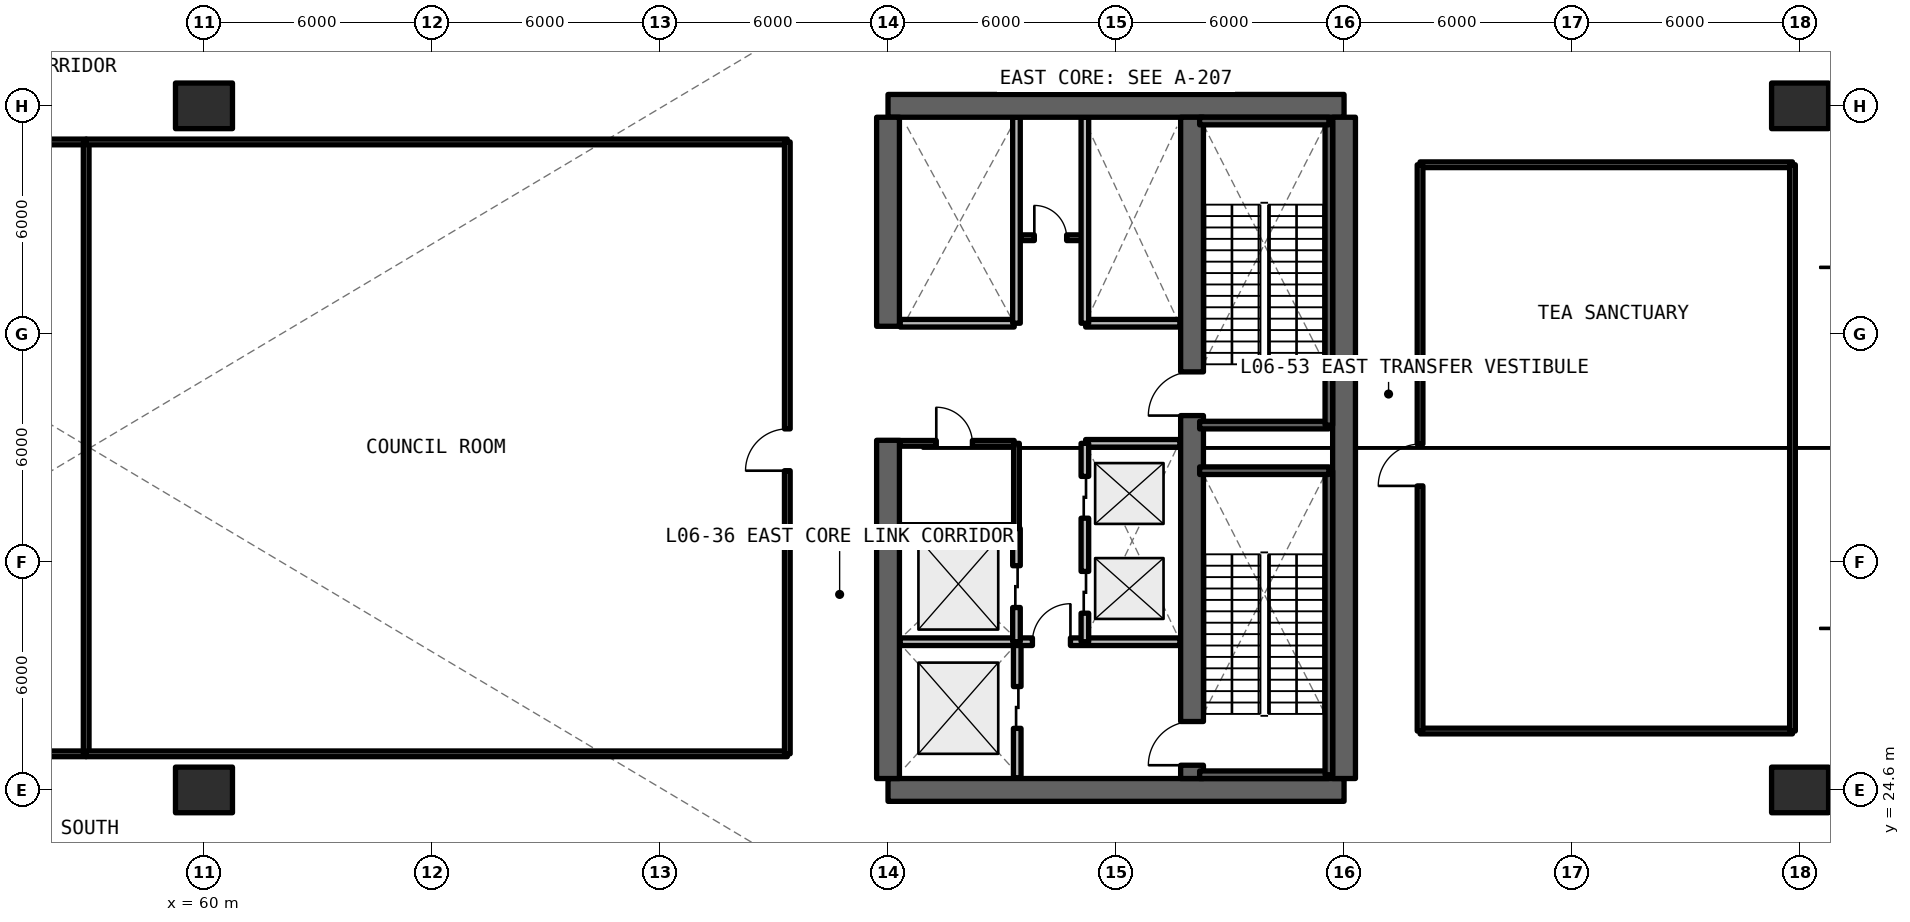
"""IFC4 building model, lengths in metres.
Left out: names, types, materials, properties, quantities, classifications, styles, units other than length and angle.
Written with IfcOpenShell. Run it as: python <this file> out.ifc"""

import sys

from ifc_helpers import new_model, si_unit, direction, frame, frame_2d, origin, origin_2d, place, context, subcontext, project, spatial, rectangle, extrude, element, fill, save


model = new_model("IFC4")
c1 = context("Model", 3, precision=1e-05, world=origin(), true_north=direction((0.0, 1.0)))
c2 = subcontext(c1, "Body", "Model", "MODEL_VIEW")
j1 = project(units=[si_unit("LENGTHUNIT", "METRE"), si_unit("PLANEANGLEUNIT", "RADIAN")], contexts=[c1])
p1 = place(None, origin())
s1 = spatial("IfcSite", under=j1, at=p1, CompositionType="ELEMENT")
p2 = place(p1, origin())
s2 = spatial("IfcBuilding", under=s1, at=p2, CompositionType="ELEMENT")
p3 = place(p2, frame((0.0, 0.0, 24.09)))
s3 = spatial("IfcBuildingStorey", under=s2, at=p3, CompositionType="ELEMENT", Elevation=24.09)
for number, where, z_axis, x_axis in (
    (1, (78.0, 24.6, 0.0), (0.0, 0.0, 1.0), (1.0, 0.0, 0.0)),
    (2, (90.0, 42.6, 0.0), (0.0, 0.0, 1.0), (-1.0, 0.0, 0.0)),
):
    element("IfcWall", number, at=place(p3, frame(where, z_axis=z_axis, x_axis=x_axis)), inside=s3, PredefinedType="SHEAR", context=c2, shape_type="SweptSolid", body=[
        extrude(rectangle(XDim=12.0, YDim=0.6, at=frame_2d((6.0, 0.0))), origin(), (0.0, 0.0, 1.0), 4.95),
    ])
p4 = place(p3, frame((90.0, 24.9, 0.0), z_axis=(0.0, 0.0, 1.0), x_axis=(0.0, 1.0, 0.0)))
e3 = element("IfcWall", 3, at=p4, inside=s3, PredefinedType="SHEAR", context=c2, shape_type="SweptSolid", body=[
    extrude(rectangle(XDim=17.4, YDim=0.6, at=frame_2d((8.7, 0.0))), origin(), (0.0, 0.0, 1.0), 4.95),
])
p5 = place(p3, frame((78.0, 24.9, 0.0), z_axis=(0.0, 0.0, 1.0), x_axis=(0.0, 1.0, 0.0)))
e4 = element("IfcWall", 4, at=p5, inside=s3, PredefinedType="SHEAR", context=c2, shape_type="SweptSolid", body=[
    extrude(rectangle(XDim=8.9, YDim=0.6, at=frame_2d((4.45, 0.0))), origin(), (0.0, 0.0, 1.0), 4.95),
])
p6 = place(p3, frame((78.0, 36.8, 0.0), z_axis=(0.0, 0.0, 1.0), x_axis=(0.0, 1.0, 0.0)))
e5 = element("IfcWall", 5, at=p6, inside=s3, PredefinedType="SHEAR", context=c2, shape_type="SweptSolid", body=[
    extrude(rectangle(XDim=5.5, YDim=0.6, at=frame_2d((2.75, 0.0))), origin(), (0.0, 0.0, 1.0), 4.95),
])
p7 = place(p3, frame((86.0, 24.9, 0.0), z_axis=(0.0, 0.0, 1.0), x_axis=(0.0, 1.0, 0.0)))
e6 = element("IfcWall", 6, at=p7, inside=s3, PredefinedType="SHEAR", context=c2, shape_type="SweptSolid", body=[
    extrude(rectangle(XDim=17.4, YDim=0.6, at=frame_2d((8.7, 0.0))), origin(), (0.0, 0.0, 1.0), 4.95),
])
p8 = place(p7, frame((0.35, 0.0, 0.0)))
e7 = element("IfcOpeningElement", 7, at=p8, cuts=e6, PredefinedType="OPENING", context=c2, shape_type="SweptSolid", body=[
    extrude(rectangle(XDim=1.15, YDim=2.15, at=frame_2d((0.575, 1.075))), frame((0.0, 0.31, 0.0), z_axis=(0.0, -1.0, 0.0), x_axis=(1.0, 0.0, 0.0)), (0.0, 0.0, 1.0), 0.62),
])
p9 = place(p7, frame((9.55, 0.0, 0.0)))
e8 = element("IfcOpeningElement", 8, at=p9, cuts=e6, PredefinedType="OPENING", context=c2, shape_type="SweptSolid", body=[
    extrude(rectangle(XDim=1.15, YDim=2.15, at=frame_2d((0.575, 1.075))), frame((0.0, 0.31, 0.0), z_axis=(0.0, -1.0, 0.0), x_axis=(1.0, 0.0, 0.0)), (0.0, 0.0, 1.0), 0.62),
])
for number, where, z_axis, x_axis in (
    (9, (60.0, 24.6, 0.0), (0.0, 0.0, 1.0), (1.0, 0.0, 0.0)),
    (10, (60.0, 42.6, 0.0), (0.0, 0.0, 1.0), (1.0, 0.0, 0.0)),
):
    element("IfcColumn", number, at=place(p3, frame(where, z_axis=z_axis, x_axis=x_axis)), inside=s3, PredefinedType="COLUMN", context=c2, shape_type="SweptSolid", body=[
        extrude(rectangle(XDim=1.5, YDim=1.2, at=origin_2d()), origin(), (0.0, 0.0, 1.0), 4.95),
    ])
for number, where, z_axis, x_axis in (
    (11, (102.0, 24.6, 0.0), (0.0, 0.0, 1.0), (1.0, 0.0, 0.0)),
    (12, (102.0, 42.6, 0.0), (0.0, 0.0, 1.0), (1.0, 0.0, 0.0)),
):
    element("IfcColumn", number, at=place(p3, frame(where, z_axis=z_axis, x_axis=x_axis)), inside=s3, PredefinedType="COLUMN", context=c2, shape_type="SweptSolid", body=[
        extrude(rectangle(XDim=1.5, YDim=1.2, at=origin_2d()), origin(), (0.0, 0.0, 1.0), 4.71),
    ])
p10 = place(p3, frame((81.4, 24.92, 0.0), z_axis=(0.0, 0.0, 1.0), x_axis=(0.0, 1.0, 0.0)))
e13 = element("IfcWall", 13, at=p10, inside=s3, PredefinedType="SOLIDWALL", context=c2, shape_type="SweptSolid", body=[
    extrude(rectangle(XDim=3.58, YDim=0.2, at=frame_2d((1.79, 0.0))), origin(), (0.0, 0.0, 1.0), 3.93),
])
p11 = place(p10, frame((1.3, 0.0, 0.0)))
e14 = element("IfcOpeningElement", 14, at=p11, cuts=e13, PredefinedType="OPENING", context=c2, shape_type="SweptSolid", body=[
    extrude(rectangle(XDim=1.1, YDim=2.2, at=frame_2d((0.55, 1.1))), frame((0.0, 0.11, 0.0), z_axis=(0.0, -1.0, 0.0), x_axis=(1.0, 0.0, 0.0)), (0.0, 0.0, 1.0), 0.22),
])
p12 = place(p3, frame((78.32, 28.5, 0.0), z_axis=(0.0, 0.0, 1.0), x_axis=(1.0, 0.0, 0.0)))
e15 = element("IfcWall", 15, at=p12, inside=s3, PredefinedType="SOLIDWALL", context=c2, shape_type="SweptSolid", body=[
    extrude(rectangle(XDim=7.36, YDim=0.2, at=frame_2d((3.68, 0.0))), origin(), (0.0, 0.0, 1.0), 3.93),
])
p13 = place(p12, frame((3.48, 0.0, 0.0)))
e16 = element("IfcOpeningElement", 16, at=p13, cuts=e15, PredefinedType="OPENING", context=c2, shape_type="SweptSolid", body=[
    extrude(rectangle(XDim=1.0, YDim=2.15, at=frame_2d((0.5, 1.075))), frame((0.0, 0.11, 0.0), z_axis=(0.0, -1.0, 0.0), x_axis=(1.0, 0.0, 0.0)), (0.0, 0.0, 1.0), 0.22),
])
p14 = place(p3, frame((81.5, 39.13, 0.0), z_axis=(0.0, 0.0, 1.0), x_axis=(1.0, 0.0, 0.0)))
e17 = element("IfcWall", 17, at=p14, inside=s3, PredefinedType="SOLIDWALL", context=c2, shape_type="SweptSolid", body=[
    extrude(rectangle(XDim=1.6, YDim=0.15, at=frame_2d((0.8, 0.0))), origin(), (0.0, 0.0, 1.0), 3.93),
])
p15 = place(p14, frame((0.35, 0.0, 0.0)))
e18 = element("IfcOpeningElement", 18, at=p15, cuts=e17, PredefinedType="OPENING", context=c2, shape_type="SweptSolid", body=[
    extrude(rectangle(XDim=0.85, YDim=2.1, at=frame_2d((0.425, 1.05))), frame((0.0, 0.085, 0.0), z_axis=(0.0, -1.0, 0.0), x_axis=(1.0, 0.0, 0.0)), (0.0, 0.0, 1.0), 0.17),
])
p16 = place(p3, frame((83.2, 33.72, 0.0), z_axis=(0.0, 0.0, 1.0), x_axis=(1.0, 0.0, 0.0)))
e19 = element("IfcWall", 19, at=p16, inside=s3, PredefinedType="SOLIDWALL", context=c2, shape_type="SweptSolid", body=[
    extrude(rectangle(XDim=2.48, YDim=0.2, at=frame_2d((1.24, 0.0))), origin(), (0.0, 0.0, 1.0), 3.93),
])
p17 = place(p3, frame((83.18, 28.5, 0.0), z_axis=(0.0, 0.0, 1.0), x_axis=(0.0, 1.0, 0.0)))
e20 = element("IfcWall", 20, at=p17, inside=s3, PredefinedType="SOLIDWALL", context=c2, shape_type="SweptSolid", body=[
    extrude(rectangle(XDim=5.22, YDim=0.2, at=frame_2d((2.61, 0.0))), origin(), (0.0, 0.0, 1.0), 3.93),
])
p18 = place(p17, frame((0.75, 0.0, 0.0)))
e21 = element("IfcOpeningElement", 21, at=p18, cuts=e20, PredefinedType="OPENING", context=c2, shape_type="SweptSolid", body=[
    extrude(rectangle(XDim=1.1, YDim=2.2, at=frame_2d((0.55, 1.1))), frame((0.0, 0.11, 0.0), z_axis=(0.0, -1.0, 0.0), x_axis=(1.0, 0.0, 0.0)), (0.0, 0.0, 1.0), 0.22),
])
p19 = place(p17, frame((3.25, 0.0, 0.0)))
e22 = element("IfcOpeningElement", 22, at=p19, cuts=e20, PredefinedType="OPENING", context=c2, shape_type="SweptSolid", body=[
    extrude(rectangle(XDim=1.1, YDim=2.2, at=frame_2d((0.55, 1.1))), frame((0.0, 0.11, 0.0), z_axis=(0.0, -1.0, 0.0), x_axis=(1.0, 0.0, 0.0)), (0.0, 0.0, 1.0), 0.22),
])
p20 = place(p3, frame((78.32, 31.48, 0.0), z_axis=(0.0, 0.0, 1.0), x_axis=(1.0, 0.0, 0.0)))
e23 = element("IfcWall", 23, at=p20, inside=s3, PredefinedType="SOLIDWALL", context=c2, shape_type="SweptSolid", body=[
    extrude(rectangle(XDim=3.0, YDim=0.2, at=frame_2d((1.5, 0.0))), origin(), (0.0, 0.0, 1.0), 3.93),
])
p21 = place(p3, frame((81.38, 28.5, 0.0), z_axis=(0.0, 0.0, 1.0), x_axis=(0.0, 1.0, 0.0)))
e24 = element("IfcWall", 24, at=p21, inside=s3, PredefinedType="SOLIDWALL", context=c2, shape_type="SweptSolid", body=[
    extrude(rectangle(XDim=2.98, YDim=0.2, at=frame_2d((1.49, 0.0))), origin(), (0.0, 0.0, 1.0), 3.93),
])
p22 = place(p21, frame((0.9, 0.0, 0.0)))
e25 = element("IfcOpeningElement", 25, at=p22, cuts=e24, PredefinedType="OPENING", context=c2, shape_type="SweptSolid", body=[
    extrude(rectangle(XDim=1.1, YDim=2.2, at=frame_2d((0.55, 1.1))), frame((0.0, 0.11, 0.0), z_axis=(0.0, -1.0, 0.0), x_axis=(1.0, 0.0, 0.0)), (0.0, 0.0, 1.0), 0.22),
])
p23 = place(p3, frame((81.38, 31.48, 0.0), z_axis=(0.0, 0.0, 1.0), x_axis=(0.0, 1.0, 0.0)))
e26 = element("IfcWall", 26, at=p23, inside=s3, PredefinedType="SOLIDWALL", context=c2, shape_type="SweptSolid", body=[
    extrude(rectangle(XDim=2.24, YDim=0.15, at=frame_2d((1.12, 0.0))), origin(), (0.0, 0.0, 1.0), 3.93),
])
p24 = place(p3, frame((78.32, 33.72, 0.0), z_axis=(0.0, 0.0, 1.0), x_axis=(1.0, 0.0, 0.0)))
e27 = element("IfcWall", 27, at=p24, inside=s3, PredefinedType="SOLIDWALL", context=c2, shape_type="SweptSolid", body=[
    extrude(rectangle(XDim=3.0, YDim=0.15, at=frame_2d((1.5, 0.0))), origin(), (0.0, 0.0, 1.0), 3.93),
])
p25 = place(p24, frame((0.95, 0.0, 0.0)))
e28 = element("IfcOpeningElement", 28, at=p25, cuts=e27, PredefinedType="OPENING", context=c2, shape_type="SweptSolid", body=[
    extrude(rectangle(XDim=0.95, YDim=2.15, at=frame_2d((0.475, 1.075))), frame((0.0, 0.085, 0.0), z_axis=(0.0, -1.0, 0.0), x_axis=(1.0, 0.0, 0.0)), (0.0, 0.0, 1.0), 0.17),
])
p26 = place(p3, frame((83.2, 36.88, 0.0), z_axis=(0.0, 0.0, 1.0), x_axis=(1.0, 0.0, 0.0)))
e29 = element("IfcWall", 29, at=p26, inside=s3, PredefinedType="SOLIDWALL", context=c2, shape_type="SweptSolid", body=[
    extrude(rectangle(XDim=2.48, YDim=0.2, at=frame_2d((1.24, 0.0))), origin(), (0.0, 0.0, 1.0), 3.93),
])
p27 = place(p3, frame((83.18, 36.88, 0.0), z_axis=(0.0, 0.0, 1.0), x_axis=(0.0, 1.0, 0.0)))
e30 = element("IfcWall", 30, at=p27, inside=s3, PredefinedType="SOLIDWALL", context=c2, shape_type="SweptSolid", body=[
    extrude(rectangle(XDim=5.42, YDim=0.2, at=frame_2d((2.71, 0.0))), origin(), (0.0, 0.0, 1.0), 3.93),
])
p28 = place(p3, frame((78.32, 36.88, 0.0), z_axis=(0.0, 0.0, 1.0), x_axis=(1.0, 0.0, 0.0)))
e31 = element("IfcWall", 31, at=p28, inside=s3, PredefinedType="SOLIDWALL", context=c2, shape_type="SweptSolid", body=[
    extrude(rectangle(XDim=3.0, YDim=0.2, at=frame_2d((1.5, 0.0))), origin(), (0.0, 0.0, 1.0), 3.93),
])
p29 = place(p3, frame((81.38, 36.88, 0.0), z_axis=(0.0, 0.0, 1.0), x_axis=(0.0, 1.0, 0.0)))
e32 = element("IfcWall", 32, at=p29, inside=s3, PredefinedType="SOLIDWALL", context=c2, shape_type="SweptSolid", body=[
    extrude(rectangle(XDim=5.42, YDim=0.2, at=frame_2d((2.71, 0.0))), origin(), (0.0, 0.0, 1.0), 3.93),
])
for number, where, z_axis, x_axis in (
    (33, (38.65, 25.55, 0.0), (0.0, 0.0, 1.0), (1.0, 0.0, 0.0)),
    (34, (38.65, 41.65, 0.0), (0.0, 0.0, 1.0), (1.0, 0.0, 0.0)),
):
    element("IfcWall", number, at=place(p3, frame(where, z_axis=z_axis, x_axis=x_axis)), inside=s3, PredefinedType="SOLIDWALL", context=c2, shape_type="SweptSolid", body=[
        extrude(rectangle(XDim=18.25, YDim=0.15, at=frame_2d((9.125, 0.0))), origin(), (0.0, 0.0, 1.0), 3.93),
    ])
p30 = place(p3, frame((56.9, 25.55, 0.0), z_axis=(0.0, 0.0, 1.0), x_axis=(0.0, 1.0, 0.0)))
e35 = element("IfcWall", 35, at=p30, inside=s3, PredefinedType="SOLIDWALL", context=c2, shape_type="SweptSolid", body=[
    extrude(rectangle(XDim=16.1, YDim=0.15, at=frame_2d((8.05, 0.0))), origin(), (0.0, 0.0, 1.0), 3.93),
])
for number, where, z_axis, x_axis in (
    (36, (56.9, 25.55, 0.0), (0.0, 0.0, 1.0), (1.0, 0.0, 0.0)),
    (37, (56.9, 41.65, 0.0), (0.0, 0.0, 1.0), (1.0, 0.0, 0.0)),
):
    element("IfcWall", number, at=place(p3, frame(where, z_axis=z_axis, x_axis=x_axis)), inside=s3, PredefinedType="SOLIDWALL", context=c2, shape_type="SweptSolid", body=[
        extrude(rectangle(XDim=18.45, YDim=0.15, at=frame_2d((9.225, 0.0))), origin(), (0.0, 0.0, 1.0), 3.93),
    ])
p31 = place(p3, frame((75.35, 25.55, 0.0), z_axis=(0.0, 0.0, 1.0), x_axis=(0.0, 1.0, 0.0)))
e38 = element("IfcWall", 38, at=p31, inside=s3, PredefinedType="SOLIDWALL", context=c2, shape_type="SweptSolid", body=[
    extrude(rectangle(XDim=16.1, YDim=0.15, at=frame_2d((8.05, 0.0))), origin(), (0.0, 0.0, 1.0), 3.93),
])
p32 = place(p31, frame((7.45, 0.0, 0.0)))
e39 = element("IfcOpeningElement", 39, at=p32, cuts=e38, PredefinedType="OPENING", context=c2, shape_type="SweptSolid", body=[
    extrude(rectangle(XDim=1.1, YDim=2.15, at=frame_2d((0.55, 1.075))), frame((0.0, 0.085, 0.0), z_axis=(0.0, -1.0, 0.0), x_axis=(1.0, 0.0, 0.0)), (0.0, 0.0, 1.0), 0.17),
])
for number, where, z_axis, x_axis in (
    (40, (92.0, 26.15, 0.0), (0.0, 0.0, 1.0), (1.0, 0.0, 0.0)),
    (41, (92.0, 41.05, 0.0), (0.0, 0.0, 1.0), (1.0, 0.0, 0.0)),
):
    element("IfcWall", number, at=place(p3, frame(where, z_axis=z_axis, x_axis=x_axis)), inside=s3, PredefinedType="SOLIDWALL", context=c2, shape_type="SweptSolid", body=[
        extrude(rectangle(XDim=9.8, YDim=0.15, at=frame_2d((4.9, 0.0))), origin(), (0.0, 0.0, 1.0), 3.93),
    ])
p33 = place(p3, frame((92.0, 26.15, 0.0), z_axis=(0.0, 0.0, 1.0), x_axis=(0.0, 1.0, 0.0)))
e42 = element("IfcWall", 42, at=p33, inside=s3, PredefinedType="SOLIDWALL", context=c2, shape_type="SweptSolid", body=[
    extrude(rectangle(XDim=14.9, YDim=0.15, at=frame_2d((7.45, 0.0))), origin(), (0.0, 0.0, 1.0), 3.93),
])
p34 = place(p33, frame((6.45, 0.0, 0.0)))
e43 = element("IfcOpeningElement", 43, at=p34, cuts=e42, PredefinedType="OPENING", context=c2, shape_type="SweptSolid", body=[
    extrude(rectangle(XDim=1.1, YDim=2.15, at=frame_2d((0.55, 1.075))), frame((0.0, 0.085, 0.0), z_axis=(0.0, -1.0, 0.0), x_axis=(1.0, 0.0, 0.0)), (0.0, 0.0, 1.0), 0.17),
])
p35 = place(p3, frame((101.8, 26.15, 0.0), z_axis=(0.0, 0.0, 1.0), x_axis=(0.0, 1.0, 0.0)))
e44 = element("IfcWall", 44, at=p35, inside=s3, PredefinedType="SOLIDWALL", context=c2, shape_type="SweptSolid", body=[
    extrude(rectangle(XDim=14.9, YDim=0.15, at=frame_2d((7.45, 0.0))), origin(), (0.0, 0.0, 1.0), 3.93),
])
p36 = place(p3, frame((86.2, 25.0, 0.0), z_axis=(0.0, 0.0, 1.0), x_axis=(1.0, 0.0, 0.0)))
e45 = element("IfcWall", 45, at=p36, inside=s3, PredefinedType="SOLIDWALL", context=c2, shape_type="SweptSolid", body=[
    extrude(rectangle(XDim=3.4, YDim=0.2, at=frame_2d((1.7, 0.0))), origin(), (0.0, 0.0, 1.0), 4.95),
])
p37 = place(p3, frame((89.6, 25.0, 0.0), z_axis=(0.0, 0.0, 1.0), x_axis=(0.0, 1.0, 0.0)))
e46 = element("IfcWall", 46, at=p37, inside=s3, PredefinedType="SOLIDWALL", context=c2, shape_type="SweptSolid", body=[
    extrude(rectangle(XDim=8.0, YDim=0.2, at=frame_2d((4.0, 0.0))), origin(), (0.0, 0.0, 1.0), 4.95),
])
for number, where, z_axis, x_axis in (
    (47, (89.6, 33.0, 0.0), (0.0, 0.0, 1.0), (-1.0, 0.0, 0.0)),
    (48, (86.2, 34.2, 0.0), (0.0, 0.0, 1.0), (1.0, 0.0, 0.0)),
):
    element("IfcWall", number, at=place(p3, frame(where, z_axis=z_axis, x_axis=x_axis)), inside=s3, PredefinedType="SOLIDWALL", context=c2, shape_type="SweptSolid", body=[
        extrude(rectangle(XDim=3.4, YDim=0.2, at=frame_2d((1.7, 0.0))), origin(), (0.0, 0.0, 1.0), 4.95),
    ])
p38 = place(p3, frame((89.6, 34.2, 0.0), z_axis=(0.0, 0.0, 1.0), x_axis=(0.0, 1.0, 0.0)))
e49 = element("IfcWall", 49, at=p38, inside=s3, PredefinedType="SOLIDWALL", context=c2, shape_type="SweptSolid", body=[
    extrude(rectangle(XDim=8.0, YDim=0.2, at=frame_2d((4.0, 0.0))), origin(), (0.0, 0.0, 1.0), 4.95),
])
p39 = place(p3, frame((89.6, 42.2, 0.0), z_axis=(0.0, 0.0, 1.0), x_axis=(-1.0, 0.0, 0.0)))
e50 = element("IfcWall", 50, at=p39, inside=s3, PredefinedType="SOLIDWALL", context=c2, shape_type="SweptSolid", body=[
    extrude(rectangle(XDim=3.4, YDim=0.2, at=frame_2d((1.7, 0.0))), origin(), (0.0, 0.0, 1.0), 4.95),
])
p40 = place(p11, origin())
e51 = element("IfcDoor", 51, at=p40, inside=s3, OperationType="SLIDING_TO_LEFT", PredefinedType="DOOR", context=c2, shape_type="SweptSolid", body=[
    extrude(rectangle(XDim=1.1, YDim=2.2, at=frame_2d((0.55, 1.1))), frame((0.0, 0.025, 0.0), z_axis=(0.0, -1.0, 0.0), x_axis=(1.0, 0.0, 0.0)), (0.0, 0.0, 1.0), 0.05),
])
fill(e14, e51)
p41 = place(p13, origin())
e52 = element("IfcDoor", 52, at=p41, inside=s3, OperationType="SINGLE_SWING_RIGHT", PredefinedType="DOOR", context=c2, shape_type="SweptSolid", body=[
    extrude(rectangle(XDim=1.0, YDim=2.15, at=frame_2d((0.5, 1.075))), frame((0.0, 0.025, 0.0), z_axis=(0.0, -1.0, 0.0), x_axis=(1.0, 0.0, 0.0)), (0.0, 0.0, 1.0), 0.05),
])
fill(e16, e52)
p42 = place(p15, origin())
e53 = element("IfcDoor", 53, at=p42, inside=s3, OperationType="SINGLE_SWING_LEFT", PredefinedType="DOOR", context=c2, shape_type="SweptSolid", body=[
    extrude(rectangle(XDim=0.85, YDim=2.1, at=frame_2d((0.425, 1.05))), frame((0.0, 0.025, 0.0), z_axis=(0.0, -1.0, 0.0), x_axis=(1.0, 0.0, 0.0)), (0.0, 0.0, 1.0), 0.05),
])
fill(e18, e53)
p43 = place(p18, origin())
e54 = element("IfcDoor", 54, at=p43, inside=s3, OperationType="SLIDING_TO_LEFT", PredefinedType="DOOR", context=c2, shape_type="SweptSolid", body=[
    extrude(rectangle(XDim=1.1, YDim=2.2, at=frame_2d((0.55, 1.1))), frame((0.0, 0.025, 0.0), z_axis=(0.0, -1.0, 0.0), x_axis=(1.0, 0.0, 0.0)), (0.0, 0.0, 1.0), 0.05),
])
fill(e21, e54)
p44 = place(p19, origin())
e55 = element("IfcDoor", 55, at=p44, inside=s3, OperationType="SLIDING_TO_RIGHT", PredefinedType="DOOR", context=c2, shape_type="SweptSolid", body=[
    extrude(rectangle(XDim=1.1, YDim=2.2, at=frame_2d((0.55, 1.1))), frame((0.0, 0.025, 0.0), z_axis=(0.0, -1.0, 0.0), x_axis=(1.0, 0.0, 0.0)), (0.0, 0.0, 1.0), 0.05),
])
fill(e22, e55)
p45 = place(p22, origin())
e56 = element("IfcDoor", 56, at=p45, inside=s3, OperationType="SLIDING_TO_LEFT", PredefinedType="DOOR", context=c2, shape_type="SweptSolid", body=[
    extrude(rectangle(XDim=1.1, YDim=2.2, at=frame_2d((0.55, 1.1))), frame((0.0, 0.025, 0.0), z_axis=(0.0, -1.0, 0.0), x_axis=(1.0, 0.0, 0.0)), (0.0, 0.0, 1.0), 0.05),
])
fill(e25, e56)
p46 = place(p25, origin())
e57 = element("IfcDoor", 57, at=p46, inside=s3, OperationType="SINGLE_SWING_LEFT", PredefinedType="DOOR", context=c2, shape_type="SweptSolid", body=[
    extrude(rectangle(XDim=0.95, YDim=2.15, at=frame_2d((0.475, 1.075))), frame((0.0, 0.025, 0.0), z_axis=(0.0, -1.0, 0.0), x_axis=(1.0, 0.0, 0.0)), (0.0, 0.0, 1.0), 0.05),
])
fill(e28, e57)
p47 = place(p32, origin())
e58 = element("IfcDoor", 58, at=p47, inside=s3, OperationType="SINGLE_SWING_LEFT", PredefinedType="DOOR", context=c2, shape_type="SweptSolid", body=[
    extrude(rectangle(XDim=1.1, YDim=2.15, at=frame_2d((0.55, 1.075))), frame((0.0, 0.025, 0.0), z_axis=(0.0, -1.0, 0.0), x_axis=(1.0, 0.0, 0.0)), (0.0, 0.0, 1.0), 0.05),
])
fill(e39, e58)
p48 = place(p34, origin())
e59 = element("IfcDoor", 59, at=p48, inside=s3, OperationType="SINGLE_SWING_LEFT", PredefinedType="DOOR", context=c2, shape_type="SweptSolid", body=[
    extrude(rectangle(XDim=1.1, YDim=2.15, at=frame_2d((0.55, 1.075))), frame((0.0, 0.025, 0.0), z_axis=(0.0, -1.0, 0.0), x_axis=(1.0, 0.0, 0.0)), (0.0, 0.0, 1.0), 0.05),
])
fill(e43, e59)
p49 = place(p8, origin())
e60 = element("IfcDoor", 60, at=p49, inside=s3, OperationType="SINGLE_SWING_RIGHT", PredefinedType="DOOR", context=c2, shape_type="SweptSolid", body=[
    extrude(rectangle(XDim=1.15, YDim=2.15, at=frame_2d((0.575, 1.075))), frame((0.0, 0.025, 0.0), z_axis=(0.0, -1.0, 0.0), x_axis=(1.0, 0.0, 0.0)), (0.0, 0.0, 1.0), 0.05),
])
fill(e7, e60)
p50 = place(p9, origin())
e61 = element("IfcDoor", 61, at=p50, inside=s3, OperationType="SINGLE_SWING_LEFT", PredefinedType="DOOR", context=c2, shape_type="SweptSolid", body=[
    extrude(rectangle(XDim=1.15, YDim=2.15, at=frame_2d((0.575, 1.075))), frame((0.0, 0.025, 0.0), z_axis=(0.0, -1.0, 0.0), x_axis=(1.0, 0.0, 0.0)), (0.0, 0.0, 1.0), 0.05),
])
fill(e8, e61)
save(model, sys.argv[1])
